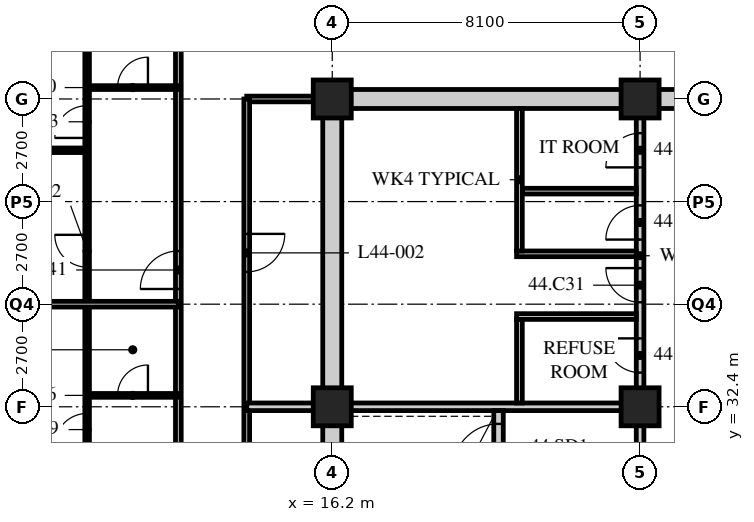
"""IFC4 building model, lengths in metres.
Left out: names, types, materials, properties, quantities, classifications, styles, units other than length and angle.
Written with IfcOpenShell. Run it as: python <this file> out.ifc"""

import sys

from ifc_helpers import new_model, si_unit, direction, frame, frame_2d, origin, origin_2d, place, context, subcontext, project, spatial, rectangle, hollow_rectangle, extrude, element, fill, save


model = new_model("IFC4")
c1 = context("Model", 3, precision=1e-05, world=origin(), true_north=direction((0.0, 1.0)))
c2 = subcontext(c1, "Body", "Model", "MODEL_VIEW")
j1 = project(units=[si_unit("LENGTHUNIT", "METRE"), si_unit("PLANEANGLEUNIT", "RADIAN")], contexts=[c1])
p1 = place(None, origin())
s1 = spatial("IfcSite", under=j1, at=p1, CompositionType="ELEMENT")
p2 = place(p1, origin())
s2 = spatial("IfcBuilding", under=s1, at=p2, CompositionType="ELEMENT")
p3 = place(p2, frame((0.0, 0.0, 174.0)))
s3 = spatial("IfcBuildingStorey", under=s2, at=p3, CompositionType="ELEMENT", Elevation=174.0)
for number, where, z_axis, x_axis in (
    (1, (16.2, 32.4, 0.0), (0.0, 0.0, 1.0), (1.0, 0.0, 0.0)),
    (2, (16.2, 40.5, 0.0), (0.0, 0.0, 1.0), (1.0, 0.0, 0.0)),
    (3, (24.3, 32.4, 0.0), (0.0, 0.0, 1.0), (1.0, 0.0, 0.0)),
    (4, (24.3, 40.5, 0.0), (0.0, 0.0, 1.0), (1.0, 0.0, 0.0)),
):
    element("IfcColumn", number, at=place(p3, frame(where, z_axis=z_axis, x_axis=x_axis)), inside=s3, PredefinedType="COLUMN", context=c2, shape_type="SweptSolid", body=[
        extrude(hollow_rectangle(XDim=1.0, YDim=1.0, WallThickness=0.1, at=origin_2d()), origin(), (0.0, 0.0, 1.0), 3.6),
    ])
p4 = place(p3, frame((12.15, 18.9, 0.0), z_axis=(0.0, 0.0, 1.0), x_axis=(0.0, 1.0, 0.0)))
e5 = element("IfcWall", 5, at=p4, inside=s3, PredefinedType="PARTITIONING", context=c2, shape_type="SweptSolid", body=[
    extrude(rectangle(XDim=24.3, YDim=0.15, at=frame_2d((12.15, 0.0))), origin(), (0.0, 0.0, 1.0), 3.39),
])
p5 = place(p4, frame((2.35, 0.0, 0.0)))
e6 = element("IfcOpeningElement", 6, at=p5, cuts=e5, PredefinedType="OPENING", context=c2, shape_type="SweptSolid", body=[
    extrude(rectangle(XDim=1.0, YDim=2.1, at=frame_2d((0.5, 1.05))), frame((0.0, 0.085, 0.0), z_axis=(0.0, -1.0, 0.0), x_axis=(1.0, 0.0, 0.0)), (0.0, 0.0, 1.0), 0.17),
])
p6 = place(p4, frame((6.4, 0.0, 0.0)))
e7 = element("IfcOpeningElement", 7, at=p6, cuts=e5, PredefinedType="OPENING", context=c2, shape_type="SweptSolid", body=[
    extrude(rectangle(XDim=1.0, YDim=2.1, at=frame_2d((0.5, 1.05))), frame((0.0, 0.085, 0.0), z_axis=(0.0, -1.0, 0.0), x_axis=(1.0, 0.0, 0.0)), (0.0, 0.0, 1.0), 0.17),
])
p7 = place(p4, frame((8.5, 0.0, 0.0)))
e8 = element("IfcOpeningElement", 8, at=p7, cuts=e5, PredefinedType="OPENING", context=c2, shape_type="SweptSolid", body=[
    extrude(rectangle(XDim=1.0, YDim=2.1, at=frame_2d((0.5, 1.05))), frame((0.0, 0.085, 0.0), z_axis=(0.0, -1.0, 0.0), x_axis=(1.0, 0.0, 0.0)), (0.0, 0.0, 1.0), 0.17),
])
p8 = place(p4, frame((16.6, 0.0, 0.0)))
e9 = element("IfcOpeningElement", 9, at=p8, cuts=e5, PredefinedType="OPENING", context=c2, shape_type="SweptSolid", body=[
    extrude(rectangle(XDim=1.0, YDim=2.1, at=frame_2d((0.5, 1.05))), frame((0.0, 0.085, 0.0), z_axis=(0.0, -1.0, 0.0), x_axis=(1.0, 0.0, 0.0)), (0.0, 0.0, 1.0), 0.17),
])
p9 = place(p3, frame((16.0, 40.5, 0.0), z_axis=(0.0, 0.0, 1.0), x_axis=(-1.0, 0.0, 0.0)))
e10 = element("IfcWall", 10, at=p9, inside=s3, PredefinedType="PARTITIONING", context=c2, shape_type="SweptSolid", body=[
    extrude(rectangle(XDim=2.05, YDim=0.15, at=frame_2d((1.025, 0.0))), origin(), (0.0, 0.0, 1.0), 3.39),
])
p10 = place(p3, frame((13.95, 40.5, 0.0), z_axis=(0.0, 0.0, 1.0), x_axis=(0.0, -1.0, 0.0)))
e11 = element("IfcWall", 11, at=p10, inside=s3, PredefinedType="PARTITIONING", context=c2, shape_type="SweptSolid", body=[
    extrude(rectangle(XDim=19.8, YDim=0.15, at=frame_2d((9.9, 0.0))), origin(), (0.0, 0.0, 1.0), 3.39),
])
p11 = place(p10, frame((11.65, 0.0, 0.0)))
e12 = element("IfcOpeningElement", 12, at=p11, cuts=e11, PredefinedType="OPENING", context=c2, shape_type="SweptSolid", body=[
    extrude(rectangle(XDim=1.0, YDim=2.1, at=frame_2d((0.5, 1.05))), frame((0.0, 0.085, 0.0), z_axis=(0.0, -1.0, 0.0), x_axis=(1.0, 0.0, 0.0)), (0.0, 0.0, 1.0), 0.17),
])
p12 = place(p10, frame((3.55, 0.0, 0.0)))
e13 = element("IfcOpeningElement", 13, at=p12, cuts=e11, PredefinedType="OPENING", context=c2, shape_type="SweptSolid", body=[
    extrude(rectangle(XDim=1.0, YDim=2.1, at=frame_2d((0.5, 1.05))), frame((0.0, 0.085, 0.0), z_axis=(0.0, -1.0, 0.0), x_axis=(1.0, 0.0, 0.0)), (0.0, 0.0, 1.0), 0.17),
])
p13 = place(p3, frame((13.95, 32.4, 0.0), z_axis=(0.0, 0.0, 1.0), x_axis=(1.0, 0.0, 0.0)))
e14 = element("IfcWall", 14, at=p13, inside=s3, PredefinedType="SOLIDWALL", context=c2, shape_type="SweptSolid", body=[
    extrude(rectangle(XDim=2.25, YDim=0.2, at=frame_2d((1.125, 0.0))), origin(), (0.0, 0.0, 1.0), 3.39),
])
p14 = place(p3, frame((9.75, 27.0, 0.0), z_axis=(0.0, 0.0, 1.0), x_axis=(0.0, 1.0, 0.0)))
e15 = element("IfcWall", 15, at=p14, inside=s3, PredefinedType="PARTITIONING", context=c2, shape_type="SweptSolid", body=[
    extrude(rectangle(XDim=16.2, YDim=0.12, at=frame_2d((8.1, 0.0))), origin(), (0.0, 0.0, 1.0), 3.39),
])
p15 = place(p14, frame((0.975, 0.0, 0.0)))
e16 = element("IfcOpeningElement", 16, at=p15, cuts=e15, PredefinedType="OPENING", context=c2, shape_type="SweptSolid", body=[
    extrude(rectangle(XDim=0.85, YDim=2.1, at=frame_2d((0.425, 1.05))), frame((0.0, 0.07, 0.0), z_axis=(0.0, -1.0, 0.0), x_axis=(1.0, 0.0, 0.0)), (0.0, 0.0, 1.0), 0.14),
])
p16 = place(p14, frame((4.375, 0.0, 0.0)))
e17 = element("IfcOpeningElement", 17, at=p16, cuts=e15, PredefinedType="OPENING", context=c2, shape_type="SweptSolid", body=[
    extrude(rectangle(XDim=0.85, YDim=2.1, at=frame_2d((0.425, 1.05))), frame((0.0, 0.07, 0.0), z_axis=(0.0, -1.0, 0.0), x_axis=(1.0, 0.0, 0.0)), (0.0, 0.0, 1.0), 0.14),
])
p17 = place(p14, frame((9.075, 0.0, 0.0)))
e18 = element("IfcOpeningElement", 18, at=p17, cuts=e15, PredefinedType="OPENING", context=c2, shape_type="SweptSolid", body=[
    extrude(rectangle(XDim=0.85, YDim=2.1, at=frame_2d((0.425, 1.05))), frame((0.0, 0.07, 0.0), z_axis=(0.0, -1.0, 0.0), x_axis=(1.0, 0.0, 0.0)), (0.0, 0.0, 1.0), 0.14),
])
p18 = place(p14, frame((12.475, 0.0, 0.0)))
e19 = element("IfcOpeningElement", 19, at=p18, cuts=e15, PredefinedType="OPENING", context=c2, shape_type="SweptSolid", body=[
    extrude(rectangle(XDim=0.85, YDim=2.1, at=frame_2d((0.425, 1.05))), frame((0.0, 0.07, 0.0), z_axis=(0.0, -1.0, 0.0), x_axis=(1.0, 0.0, 0.0)), (0.0, 0.0, 1.0), 0.14),
])
p19 = place(p3, frame((12.15, 32.7, 0.0), z_axis=(0.0, 0.0, 1.0), x_axis=(-1.0, 0.0, 0.0)))
e20 = element("IfcWall", 20, at=p19, inside=s3, PredefinedType="PARTITIONING", context=c2, shape_type="SweptSolid", body=[
    extrude(rectangle(XDim=2.4, YDim=0.1, at=frame_2d((1.2, 0.0))), origin(), (0.0, 0.0, 1.0), 3.39),
])
p20 = place(p19, frame((0.8, 0.0, 0.0)))
e21 = element("IfcOpeningElement", 21, at=p20, cuts=e20, PredefinedType="OPENING", context=c2, shape_type="SweptSolid", body=[
    extrude(rectangle(XDim=0.8, YDim=2.1, at=frame_2d((0.4, 1.05))), frame((0.0, 0.06, 0.0), z_axis=(0.0, -1.0, 0.0), x_axis=(1.0, 0.0, 0.0)), (0.0, 0.0, 1.0), 0.12),
])
p21 = place(p3, frame((12.15, 35.1, 0.0), z_axis=(0.0, 0.0, 1.0), x_axis=(-1.0, 0.0, 0.0)))
e22 = element("IfcWall", 22, at=p21, inside=s3, PredefinedType="PARTITIONING", context=c2, shape_type="SweptSolid", body=[
    extrude(rectangle(XDim=11.85, YDim=0.15, at=frame_2d((5.925, 0.0))), origin(), (0.0, 0.0, 1.0), 2.778),
])
p22 = place(p3, frame((12.15, 40.8, 0.0), z_axis=(0.0, 0.0, 1.0), x_axis=(-1.0, 0.0, 0.0)))
e23 = element("IfcWall", 23, at=p22, inside=s3, PredefinedType="PARTITIONING", context=c2, shape_type="SweptSolid", body=[
    extrude(rectangle(XDim=2.4, YDim=0.1, at=frame_2d((1.2, 0.0))), origin(), (0.0, 0.0, 1.0), 3.39),
])
p23 = place(p22, frame((0.8, 0.0, 0.0)))
e24 = element("IfcOpeningElement", 24, at=p23, cuts=e23, PredefinedType="OPENING", context=c2, shape_type="SweptSolid", body=[
    extrude(rectangle(XDim=0.8, YDim=2.1, at=frame_2d((0.4, 1.05))), frame((0.0, 0.06, 0.0), z_axis=(0.0, -1.0, 0.0), x_axis=(1.0, 0.0, 0.0)), (0.0, 0.0, 1.0), 0.12),
])
p24 = place(p3, frame((9.75, 39.15, 0.0), z_axis=(0.0, 0.0, 1.0), x_axis=(-1.0, 0.0, 0.0)))
e25 = element("IfcWall", 25, at=p24, inside=s3, PredefinedType="PARTITIONING", context=c2, shape_type="SweptSolid", body=[
    extrude(rectangle(XDim=9.45, YDim=0.12, at=frame_2d((4.725, 0.0))), origin(), (0.0, 0.0, 1.0), 3.39),
])
p25 = place(p3, frame((15.95, 40.5, 0.0), z_axis=(0.0, 0.0, 1.0), x_axis=(1.0, 0.0, 0.0)))
e26 = element("IfcWall", 26, at=p25, inside=s3, PredefinedType="SOLIDWALL", context=c2, shape_type="SweptSolid", body=[
    extrude(rectangle(XDim=24.8, YDim=0.5, at=frame_2d((12.4, 0.0))), origin(), (0.0, 0.0, 1.0), 2.74),
])
p26 = place(p25, frame((11.5, 0.0, 0.0)))
e27 = element("IfcOpeningElement", 27, at=p26, cuts=e26, PredefinedType="OPENING", context=c2, shape_type="SweptSolid", body=[
    extrude(rectangle(XDim=1.8, YDim=2.4, at=frame_2d((0.9, 1.2))), frame((0.0, 0.26, 0.0), z_axis=(0.0, -1.0, 0.0), x_axis=(1.0, 0.0, 0.0)), (0.0, 0.0, 1.0), 0.52),
])
p27 = place(p3, frame((16.2, 24.55, 0.0), z_axis=(0.0, 0.0, 1.0), x_axis=(0.0, 1.0, 0.0)))
e28 = element("IfcWall", 28, at=p27, inside=s3, PredefinedType="SOLIDWALL", context=c2, shape_type="SweptSolid", body=[
    extrude(rectangle(XDim=15.7, YDim=0.5, at=frame_2d((7.85, 0.0))), origin(), (0.0, 0.0, 1.0), 2.778),
])
p28 = place(p3, frame((16.45, 32.4, 0.0), z_axis=(0.0, 0.0, 1.0), x_axis=(1.0, 0.0, 0.0)))
e29 = element("IfcWall", 29, at=p28, inside=s3, PredefinedType="SOLIDWALL", context=c2, shape_type="SweptSolid", body=[
    extrude(rectangle(XDim=7.95, YDim=0.2, at=frame_2d((3.975, 0.0))), origin(), (0.0, 0.0, 1.0), 2.778),
])
p29 = place(p3, frame((24.3, 24.55, 0.0), z_axis=(0.0, 0.0, 1.0), x_axis=(0.0, 1.0, 0.0)))
e30 = element("IfcWall", 30, at=p29, inside=s3, PredefinedType="SOLIDWALL", context=c2, shape_type="SweptSolid", body=[
    extrude(rectangle(XDim=7.75, YDim=0.2, at=frame_2d((3.875, 0.0))), origin(), (0.0, 0.0, 1.0), 2.778),
])
p30 = place(p29, frame((4.6, 0.0, 0.0)))
e31 = element("IfcOpeningElement", 31, at=p30, cuts=e30, PredefinedType="OPENING", context=c2, shape_type="SweptSolid", body=[
    extrude(rectangle(XDim=1.2, YDim=2.1, at=frame_2d((0.6, 1.05))), frame((0.0, 0.11, 0.0), z_axis=(0.0, -1.0, 0.0), x_axis=(1.0, 0.0, 0.0)), (0.0, 0.0, 1.0), 0.22),
])
p31 = place(p3, frame((20.575, 24.55, 0.0), z_axis=(0.0, 0.0, 1.0), x_axis=(0.0, 1.0, 0.0)))
e32 = element("IfcWall", 32, at=p31, inside=s3, PredefinedType="SOLIDWALL", context=c2, shape_type="SweptSolid", body=[
    extrude(rectangle(XDim=7.75, YDim=0.25, at=frame_2d((3.875, 0.0))), origin(), (0.0, 0.0, 1.0), 3.39),
])
p32 = place(p31, frame((6.2, 0.0, 0.0)))
e33 = element("IfcOpeningElement", 33, at=p32, cuts=e32, PredefinedType="OPENING", context=c2, shape_type="SweptSolid", body=[
    extrude(rectangle(XDim=1.2, YDim=2.1, at=frame_2d((0.6, 1.05))), frame((0.0, 0.135, 0.0), z_axis=(0.0, -1.0, 0.0), x_axis=(1.0, 0.0, 0.0)), (0.0, 0.0, 1.0), 0.27),
])
p33 = place(p3, frame((24.3, 32.5, 0.0), z_axis=(0.0, 0.0, 1.0), x_axis=(0.0, 1.0, 0.0)))
e34 = element("IfcWall", 34, at=p33, inside=s3, PredefinedType="PARTITIONING", context=c2, shape_type="SweptSolid", body=[
    extrude(rectangle(XDim=7.75, YDim=0.2, at=frame_2d((3.875, 0.0))), origin(), (0.0, 0.0, 1.0), 2.778),
])
p34 = place(p33, frame((0.8, 0.0, 0.0)))
e35 = element("IfcOpeningElement", 35, at=p34, cuts=e34, PredefinedType="OPENING", context=c2, shape_type="SweptSolid", body=[
    extrude(rectangle(XDim=0.9, YDim=2.1, at=frame_2d((0.45, 1.05))), frame((0.0, 0.11, 0.0), z_axis=(0.0, -1.0, 0.0), x_axis=(1.0, 0.0, 0.0)), (0.0, 0.0, 1.0), 0.22),
])
p35 = place(p33, frame((2.65, 0.0, 0.0)))
e36 = element("IfcOpeningElement", 36, at=p35, cuts=e34, PredefinedType="OPENING", context=c2, shape_type="SweptSolid", body=[
    extrude(rectangle(XDim=0.9, YDim=2.1, at=frame_2d((0.45, 1.05))), frame((0.0, 0.11, 0.0), z_axis=(0.0, -1.0, 0.0), x_axis=(1.0, 0.0, 0.0)), (0.0, 0.0, 1.0), 0.22),
])
p36 = place(p33, frame((4.3, 0.0, 0.0)))
e37 = element("IfcOpeningElement", 37, at=p36, cuts=e34, PredefinedType="OPENING", context=c2, shape_type="SweptSolid", body=[
    extrude(rectangle(XDim=0.9, YDim=2.1, at=frame_2d((0.45, 1.05))), frame((0.0, 0.11, 0.0), z_axis=(0.0, -1.0, 0.0), x_axis=(1.0, 0.0, 0.0)), (0.0, 0.0, 1.0), 0.22),
])
p37 = place(p33, frame((6.2, 0.0, 0.0)))
e38 = element("IfcOpeningElement", 38, at=p37, cuts=e34, PredefinedType="OPENING", context=c2, shape_type="SweptSolid", body=[
    extrude(rectangle(XDim=0.9, YDim=2.1, at=frame_2d((0.45, 1.05))), frame((0.0, 0.11, 0.0), z_axis=(0.0, -1.0, 0.0), x_axis=(1.0, 0.0, 0.0)), (0.0, 0.0, 1.0), 0.22),
])
for number, where, z_axis, x_axis in (
    (39, (21.05, 34.775, 0.0), (0.0, 0.0, 1.0), (1.0, 0.0, 0.0)),
    (40, (21.05, 36.425, 0.0), (0.0, 0.0, 1.0), (1.0, 0.0, 0.0)),
):
    element("IfcWall", number, at=place(p3, frame(where, z_axis=z_axis, x_axis=x_axis)), inside=s3, PredefinedType="PARTITIONING", context=c2, shape_type="SweptSolid", body=[
        extrude(rectangle(XDim=3.15, YDim=0.15, at=frame_2d((1.575, 0.0))), origin(), (0.0, 0.0, 1.0), 3.39),
    ])
p38 = place(p3, frame((21.2, 38.075, 0.0), z_axis=(0.0, 0.0, 1.0), x_axis=(1.0, 0.0, 0.0)))
e41 = element("IfcWall", 41, at=p38, inside=s3, PredefinedType="PARTITIONING", context=c2, shape_type="SweptSolid", body=[
    extrude(rectangle(XDim=3.0, YDim=0.15, at=frame_2d((1.5, 0.0))), origin(), (0.0, 0.0, 1.0), 3.39),
])
p39 = place(p3, frame((21.125, 32.5, 0.0), z_axis=(0.0, 0.0, 1.0), x_axis=(0.0, 1.0, 0.0)))
e42 = element("IfcWall", 42, at=p39, inside=s3, PredefinedType="PARTITIONING", context=c2, shape_type="SweptSolid", body=[
    extrude(rectangle(XDim=2.2, YDim=0.15, at=frame_2d((1.1, 0.0))), origin(), (0.0, 0.0, 1.0), 3.39),
])
p40 = place(p3, frame((21.125, 36.5, 0.0), z_axis=(0.0, 0.0, 1.0), x_axis=(0.0, 1.0, 0.0)))
e43 = element("IfcWall", 43, at=p40, inside=s3, PredefinedType="PARTITIONING", context=c2, shape_type="SweptSolid", body=[
    extrude(rectangle(XDim=3.75, YDim=0.15, at=frame_2d((1.875, 0.0))), origin(), (0.0, 0.0, 1.0), 3.39),
])
p41 = place(p12, origin())
e44 = element("IfcDoor", 44, at=p41, inside=s3, OperationType="SINGLE_SWING_LEFT", PredefinedType="DOOR", context=c2, shape_type="SweptSolid", body=[
    extrude(rectangle(XDim=1.0, YDim=2.1, at=frame_2d((0.5, 1.05))), frame((0.0, 0.025, 0.0), z_axis=(0.0, -1.0, 0.0), x_axis=(1.0, 0.0, 0.0)), (0.0, 0.0, 1.0), 0.05),
])
fill(e13, e44)
p42 = place(p20, origin())
e45 = element("IfcDoor", 45, at=p42, inside=s3, OperationType="SINGLE_SWING_RIGHT", PredefinedType="DOOR", context=c2, shape_type="SweptSolid", body=[
    extrude(rectangle(XDim=0.8, YDim=2.1, at=frame_2d((0.4, 1.05))), frame((0.0, 0.025, 0.0), z_axis=(0.0, -1.0, 0.0), x_axis=(1.0, 0.0, 0.0)), (0.0, 0.0, 1.0), 0.05),
])
fill(e21, e45)
p43 = place(p16, origin())
e46 = element("IfcDoor", 46, at=p43, inside=s3, OperationType="SINGLE_SWING_LEFT", PredefinedType="DOOR", context=c2, shape_type="SweptSolid", body=[
    extrude(rectangle(XDim=0.85, YDim=2.1, at=frame_2d((0.425, 1.05))), frame((0.0, 0.025, 0.0), z_axis=(0.0, -1.0, 0.0), x_axis=(1.0, 0.0, 0.0)), (0.0, 0.0, 1.0), 0.05),
])
fill(e17, e46)
p44 = place(p23, origin())
e47 = element("IfcDoor", 47, at=p44, inside=s3, OperationType="SINGLE_SWING_RIGHT", PredefinedType="DOOR", context=c2, shape_type="SweptSolid", body=[
    extrude(rectangle(XDim=0.8, YDim=2.1, at=frame_2d((0.4, 1.05))), frame((0.0, 0.025, 0.0), z_axis=(0.0, -1.0, 0.0), x_axis=(1.0, 0.0, 0.0)), (0.0, 0.0, 1.0), 0.05),
])
fill(e24, e47)
p45 = place(p8, origin())
e48 = element("IfcDoor", 48, at=p45, inside=s3, OperationType="SINGLE_SWING_LEFT", PredefinedType="DOOR", context=c2, shape_type="SweptSolid", body=[
    extrude(rectangle(XDim=1.0, YDim=2.1, at=frame_2d((0.5, 1.05))), frame((0.0, 0.025, 0.0), z_axis=(0.0, -1.0, 0.0), x_axis=(1.0, 0.0, 0.0)), (0.0, 0.0, 1.0), 0.05),
])
fill(e9, e48)
p46 = place(p17, origin())
e49 = element("IfcDoor", 49, at=p46, inside=s3, OperationType="SINGLE_SWING_RIGHT", PredefinedType="DOOR", context=c2, shape_type="SweptSolid", body=[
    extrude(rectangle(XDim=0.85, YDim=2.1, at=frame_2d((0.425, 1.05))), frame((0.0, 0.025, 0.0), z_axis=(0.0, -1.0, 0.0), x_axis=(1.0, 0.0, 0.0)), (0.0, 0.0, 1.0), 0.05),
])
fill(e18, e49)
p47 = place(p18, origin())
e50 = element("IfcDoor", 50, at=p47, inside=s3, OperationType="SINGLE_SWING_LEFT", PredefinedType="DOOR", context=c2, shape_type="SweptSolid", body=[
    extrude(rectangle(XDim=0.85, YDim=2.1, at=frame_2d((0.425, 1.05))), frame((0.0, 0.025, 0.0), z_axis=(0.0, -1.0, 0.0), x_axis=(1.0, 0.0, 0.0)), (0.0, 0.0, 1.0), 0.05),
])
fill(e19, e50)
p48 = place(p34, origin())
e51 = element("IfcDoor", 51, at=p48, inside=s3, OperationType="SINGLE_SWING_RIGHT", PredefinedType="DOOR", context=c2, shape_type="SweptSolid", body=[
    extrude(rectangle(XDim=0.9, YDim=2.1, at=frame_2d((0.45, 1.05))), frame((0.0, 0.025, 0.0), z_axis=(0.0, -1.0, 0.0), x_axis=(1.0, 0.0, 0.0)), (0.0, 0.0, 1.0), 0.05),
])
fill(e35, e51)
p49 = place(p35, origin())
e52 = element("IfcDoor", 52, at=p49, inside=s3, OperationType="SINGLE_SWING_RIGHT", PredefinedType="DOOR", context=c2, shape_type="SweptSolid", body=[
    extrude(rectangle(XDim=0.9, YDim=2.1, at=frame_2d((0.45, 1.05))), frame((0.0, 0.025, 0.0), z_axis=(0.0, -1.0, 0.0), x_axis=(1.0, 0.0, 0.0)), (0.0, 0.0, 1.0), 0.05),
])
fill(e36, e52)
p50 = place(p36, origin())
e53 = element("IfcDoor", 53, at=p50, inside=s3, OperationType="SINGLE_SWING_LEFT", PredefinedType="DOOR", context=c2, shape_type="SweptSolid", body=[
    extrude(rectangle(XDim=0.9, YDim=2.1, at=frame_2d((0.45, 1.05))), frame((0.0, 0.025, 0.0), z_axis=(0.0, -1.0, 0.0), x_axis=(1.0, 0.0, 0.0)), (0.0, 0.0, 1.0), 0.05),
])
fill(e37, e53)
p51 = place(p37, origin())
e54 = element("IfcDoor", 54, at=p51, inside=s3, OperationType="SINGLE_SWING_LEFT", PredefinedType="DOOR", context=c2, shape_type="SweptSolid", body=[
    extrude(rectangle(XDim=0.9, YDim=2.1, at=frame_2d((0.45, 1.05))), frame((0.0, 0.025, 0.0), z_axis=(0.0, -1.0, 0.0), x_axis=(1.0, 0.0, 0.0)), (0.0, 0.0, 1.0), 0.05),
])
fill(e38, e54)
p52 = place(p32, origin())
e55 = element("IfcDoor", 55, at=p52, inside=s3, OperationType="SINGLE_SWING_LEFT", PredefinedType="DOOR", context=c2, shape_type="SweptSolid", body=[
    extrude(rectangle(XDim=1.2, YDim=2.1, at=frame_2d((0.6, 1.05))), frame((0.0, 0.025, 0.0), z_axis=(0.0, -1.0, 0.0), x_axis=(1.0, 0.0, 0.0)), (0.0, 0.0, 1.0), 0.05),
])
fill(e33, e55)
save(model, sys.argv[1])
